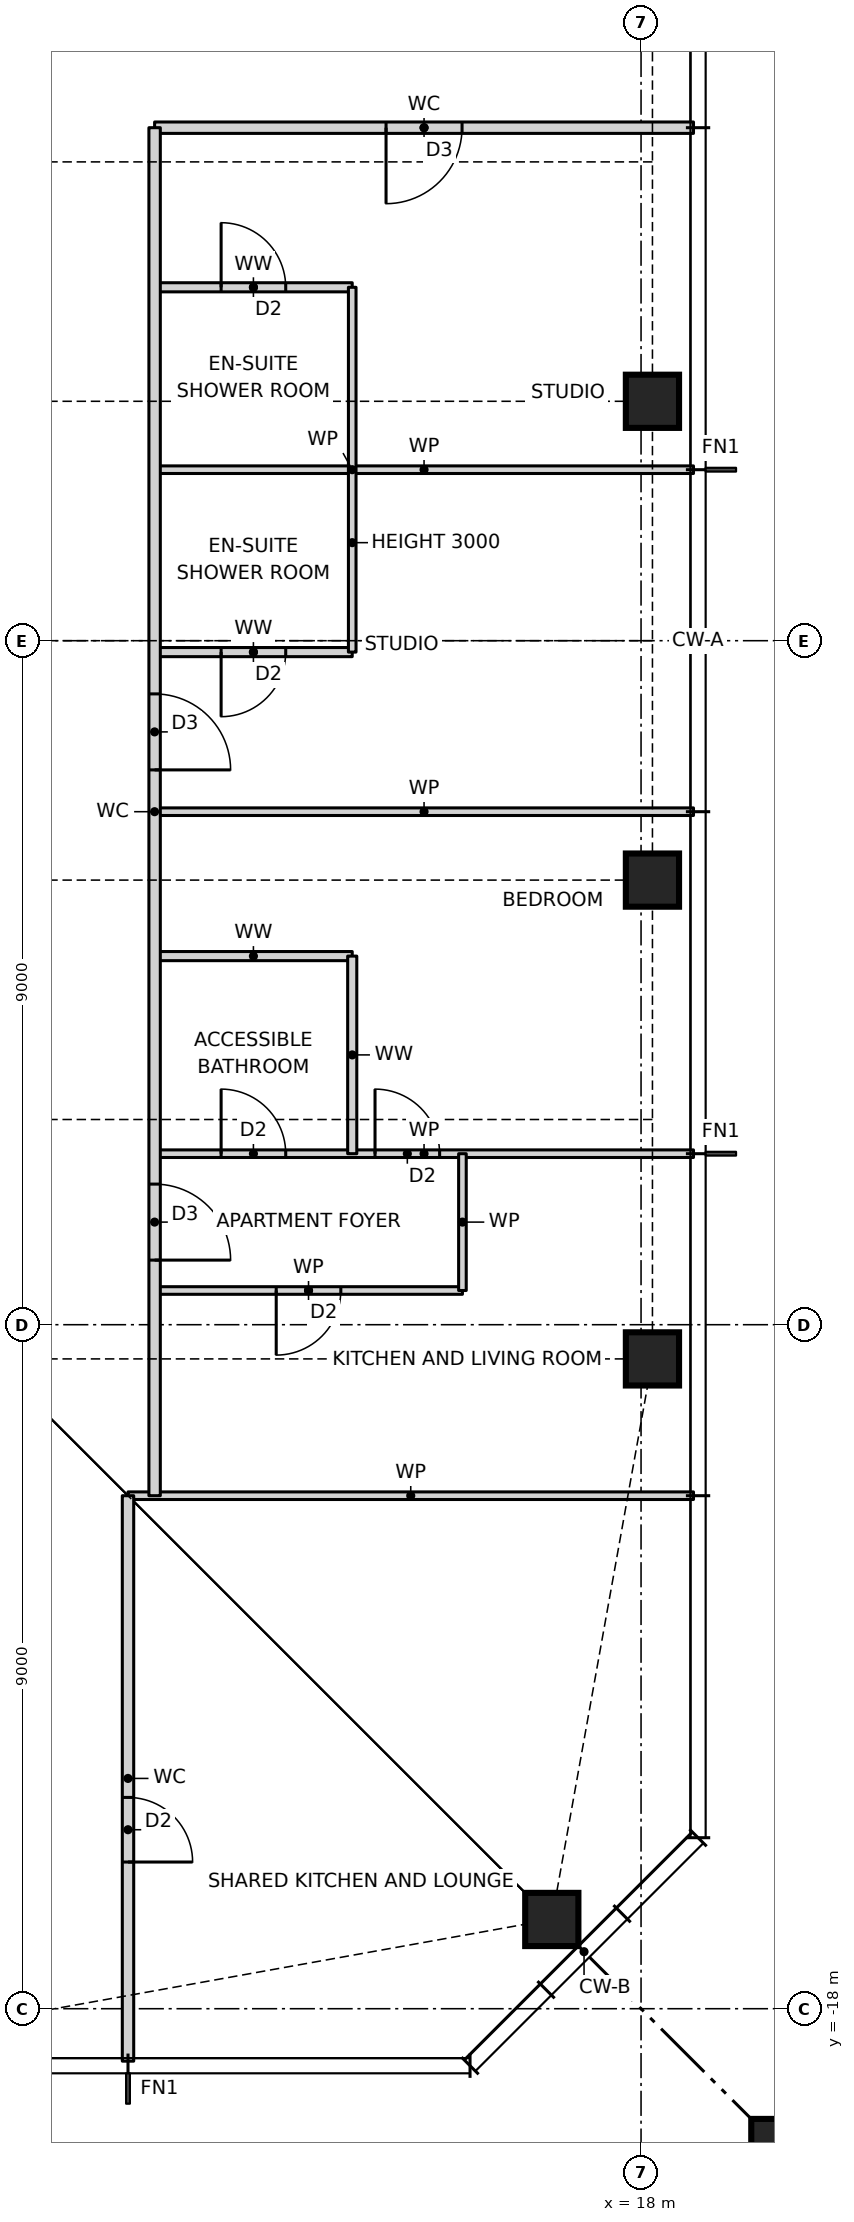
"""IFC4 building model, lengths in metres.
Left out: names, types, materials, properties, quantities, classifications, styles, units other than length and angle.
Written with IfcOpenShell. Run it as: python <this file> out.ifc"""

import sys

from ifc_helpers import new_model, si_unit, direction, frame, frame_2d, origin, origin_2d, place, context, subcontext, project, spatial, rectangle, hollow_rectangle, i_section, extrude, element, fill, save


model = new_model("IFC4")
c1 = context("Model", 3, precision=1e-05, world=origin(), true_north=direction((0.0, 1.0)))
c2 = subcontext(c1, "Body", "Model", "MODEL_VIEW")
j1 = project(units=[si_unit("LENGTHUNIT", "METRE"), si_unit("PLANEANGLEUNIT", "RADIAN")], contexts=[c1])
p1 = place(None, origin())
s1 = spatial("IfcSite", under=j1, at=p1, CompositionType="ELEMENT")
p2 = place(p1, origin())
s2 = spatial("IfcBuilding", under=s1, at=p2, CompositionType="ELEMENT")
p3 = place(p2, frame((0.0, 0.0, 160.0)))
s3 = spatial("IfcBuildingStorey", under=s2, at=p3, CompositionType="ELEMENT", Elevation=160.0)
for number, where, z_axis, x_axis in (
    (1, (16.826, -16.826, 0.0), (0.0, 0.0, 1.0), (1.0, 0.0, 0.0)),
    (2, (18.15, -9.45, 0.0), (0.0, 0.0, 1.0), (1.0, 0.0, 0.0)),
    (3, (18.15, -3.15, 0.0), (0.0, 0.0, 1.0), (1.0, 0.0, 0.0)),
    (4, (18.15, 3.15, 0.0), (0.0, 0.0, 1.0), (1.0, 0.0, 0.0)),
):
    element("IfcColumn", number, at=place(p3, frame(where, z_axis=z_axis, x_axis=x_axis)), inside=s3, PredefinedType="COLUMN", context=c2, shape_type="SweptSolid", body=[
        extrude(hollow_rectangle(XDim=0.7, YDim=0.7, WallThickness=0.06, at=origin_2d()), origin(), (0.0, 0.0, 1.0), 3.5),
    ])
p4 = place(p3, frame((21.65, -21.65, 0.0), z_axis=(0.0, 0.0, 1.0), x_axis=(1.0, 0.0, 0.0)))
e5 = element("IfcColumn", 5, at=p4, inside=s3, PredefinedType="COLUMN", context=c2, shape_type="SweptSolid", body=[
    extrude(rectangle(XDim=4.4, YDim=4.4, at=origin_2d()), origin(), (0.0, 0.0, 1.0), 3.5),
    extrude(i_section(OverallWidth=0.478, OverallDepth=0.599, WebThickness=0.1, FlangeThickness=0.14, at=origin_2d()), origin(), (0.0, 0.0, 1.0), 3.5),
])
p5 = place(p3, frame((11.25, -11.25, 0.0), z_axis=(0.0, 0.0, 1.0), x_axis=(1.0, 0.0, 0.0)))
e6 = element("IfcWall", 6, at=p5, inside=s3, PredefinedType="PARTITIONING", context=c2, shape_type="SweptSolid", body=[
    extrude(rectangle(XDim=7.44, YDim=0.1, at=frame_2d((3.72, 0.0))), origin(), (0.0, 0.0, 1.0), 3.27),
])
p6 = place(p3, frame((11.6, -8.55, 0.0), z_axis=(0.0, 0.0, 1.0), x_axis=(1.0, 0.0, 0.0)))
e7 = element("IfcWall", 7, at=p6, inside=s3, PredefinedType="PARTITIONING", context=c2, shape_type="SweptSolid", body=[
    extrude(rectangle(XDim=4.05, YDim=0.1, at=frame_2d((2.025, 0.0))), origin(), (0.0, 0.0, 1.0), 3.27),
])
p7 = place(p6, frame((1.6, 0.0, 0.0)))
e8 = element("IfcOpeningElement", 8, at=p7, cuts=e7, PredefinedType="OPENING", context=c2, shape_type="SweptSolid", body=[
    extrude(rectangle(XDim=0.85, YDim=2.1, at=frame_2d((0.425, 1.05))), frame((0.0, 0.06, 0.0), z_axis=(0.0, -1.0, 0.0), x_axis=(1.0, 0.0, 0.0)), (0.0, 0.0, 1.0), 0.12),
])
p8 = place(p3, frame((11.6, -6.75, 0.0), z_axis=(0.0, 0.0, 1.0), x_axis=(1.0, 0.0, 0.0)))
e9 = element("IfcWall", 9, at=p8, inside=s3, PredefinedType="PARTITIONING", context=c2, shape_type="SweptSolid", body=[
    extrude(rectangle(XDim=7.09, YDim=0.1, at=frame_2d((3.545, 0.0))), origin(), (0.0, 0.0, 1.0), 3.27),
])
p9 = place(p8, frame((2.9, 0.0, 0.0)))
e10 = element("IfcOpeningElement", 10, at=p9, cuts=e9, PredefinedType="OPENING", context=c2, shape_type="SweptSolid", body=[
    extrude(rectangle(XDim=0.85, YDim=2.1, at=frame_2d((0.425, 1.05))), frame((0.0, 0.06, 0.0), z_axis=(0.0, -1.0, 0.0), x_axis=(1.0, 0.0, 0.0)), (0.0, 0.0, 1.0), 0.12),
])
p10 = place(p8, frame((0.875, 0.0, 0.0)))
e11 = element("IfcOpeningElement", 11, at=p10, cuts=e9, PredefinedType="OPENING", context=c2, shape_type="SweptSolid", body=[
    extrude(rectangle(XDim=0.85, YDim=2.1, at=frame_2d((0.425, 1.05))), frame((0.0, 0.06, 0.0), z_axis=(0.0, -1.0, 0.0), x_axis=(1.0, 0.0, 0.0)), (0.0, 0.0, 1.0), 0.12),
])
p11 = place(p3, frame((11.6, -4.15, 0.0), z_axis=(0.0, 0.0, 1.0), x_axis=(1.0, 0.0, 0.0)))
e12 = element("IfcWall", 12, at=p11, inside=s3, PredefinedType="PARTITIONING", context=c2, shape_type="SweptSolid", body=[
    extrude(rectangle(XDim=2.6, YDim=0.12, at=frame_2d((1.3, 0.0))), origin(), (0.0, 0.0, 1.0), 3.27),
])
p12 = place(p3, frame((11.6, -2.25, 0.0), z_axis=(0.0, 0.0, 1.0), x_axis=(1.0, 0.0, 0.0)))
e13 = element("IfcWall", 13, at=p12, inside=s3, PredefinedType="PARTITIONING", context=c2, shape_type="SweptSolid", body=[
    extrude(rectangle(XDim=7.09, YDim=0.1, at=frame_2d((3.545, 0.0))), origin(), (0.0, 0.0, 1.0), 3.27),
])
p13 = place(p3, frame((11.6, -0.15, 0.0), z_axis=(0.0, 0.0, 1.0), x_axis=(1.0, 0.0, 0.0)))
e14 = element("IfcWall", 14, at=p13, inside=s3, PredefinedType="PARTITIONING", context=c2, shape_type="SweptSolid", body=[
    extrude(rectangle(XDim=2.6, YDim=0.12, at=frame_2d((1.3, 0.0))), origin(), (0.0, 0.0, 1.0), 3.27),
])
p14 = place(p13, frame((0.875, 0.0, 0.0)))
e15 = element("IfcOpeningElement", 15, at=p14, cuts=e14, PredefinedType="OPENING", context=c2, shape_type="SweptSolid", body=[
    extrude(rectangle(XDim=0.85, YDim=2.1, at=frame_2d((0.425, 1.05))), frame((0.0, 0.07, 0.0), z_axis=(0.0, -1.0, 0.0), x_axis=(1.0, 0.0, 0.0)), (0.0, 0.0, 1.0), 0.14),
])
p15 = place(p3, frame((11.6, 2.25, 0.0), z_axis=(0.0, 0.0, 1.0), x_axis=(1.0, 0.0, 0.0)))
e16 = element("IfcWall", 16, at=p15, inside=s3, PredefinedType="PARTITIONING", context=c2, shape_type="SweptSolid", body=[
    extrude(rectangle(XDim=7.09, YDim=0.1, at=frame_2d((3.545, 0.0))), origin(), (0.0, 0.0, 1.0), 3.27),
])
p16 = place(p3, frame((11.6, 4.65, 0.0), z_axis=(0.0, 0.0, 1.0), x_axis=(1.0, 0.0, 0.0)))
e17 = element("IfcWall", 17, at=p16, inside=s3, PredefinedType="PARTITIONING", context=c2, shape_type="SweptSolid", body=[
    extrude(rectangle(XDim=2.6, YDim=0.12, at=frame_2d((1.3, 0.0))), origin(), (0.0, 0.0, 1.0), 3.27),
])
p17 = place(p16, frame((0.875, 0.0, 0.0)))
e18 = element("IfcOpeningElement", 18, at=p17, cuts=e17, PredefinedType="OPENING", context=c2, shape_type="SweptSolid", body=[
    extrude(rectangle(XDim=0.85, YDim=2.1, at=frame_2d((0.425, 1.05))), frame((0.0, 0.07, 0.0), z_axis=(0.0, -1.0, 0.0), x_axis=(1.0, 0.0, 0.0)), (0.0, 0.0, 1.0), 0.14),
])
p18 = place(p3, frame((11.6, 6.75, 0.0), z_axis=(0.0, 0.0, 1.0), x_axis=(1.0, 0.0, 0.0)))
e19 = element("IfcWall", 19, at=p18, inside=s3, PredefinedType="PARTITIONING", context=c2, shape_type="SweptSolid", body=[
    extrude(rectangle(XDim=7.09, YDim=0.15, at=frame_2d((3.545, 0.0))), origin(), (0.0, 0.0, 1.0), 3.27),
])
p19 = place(p18, frame((3.045, 0.0, 0.0)))
e20 = element("IfcOpeningElement", 20, at=p19, cuts=e19, PredefinedType="OPENING", context=c2, shape_type="SweptSolid", body=[
    extrude(rectangle(XDim=1.0, YDim=2.1, at=frame_2d((0.5, 1.05))), frame((0.0, 0.085, 0.0), z_axis=(0.0, -1.0, 0.0), x_axis=(1.0, 0.0, 0.0)), (0.0, 0.0, 1.0), 0.17),
])
p20 = place(p3, frame((15.65, -8.55, 0.0), z_axis=(0.0, 0.0, 1.0), x_axis=(0.0, 1.0, 0.0)))
e21 = element("IfcWall", 21, at=p20, inside=s3, PredefinedType="PARTITIONING", context=c2, shape_type="SweptSolid", body=[
    extrude(rectangle(XDim=1.8, YDim=0.1, at=frame_2d((0.9, 0.0))), origin(), (0.0, 0.0, 1.0), 3.27),
])
p21 = place(p3, frame((14.2, -6.75, 0.0), z_axis=(0.0, 0.0, 1.0), x_axis=(0.0, 1.0, 0.0)))
e22 = element("IfcWall", 22, at=p21, inside=s3, PredefinedType="PARTITIONING", context=c2, shape_type="SweptSolid", body=[
    extrude(rectangle(XDim=2.6, YDim=0.12, at=frame_2d((1.3, 0.0))), origin(), (0.0, 0.0, 1.0), 3.27),
])
p22 = place(p3, frame((14.2, -0.15, 0.0), z_axis=(0.0, 0.0, 1.0), x_axis=(0.0, 1.0, 0.0)))
e23 = element("IfcWall", 23, at=p22, inside=s3, PredefinedType="PARTITIONING", context=c2, shape_type="SweptSolid", body=[
    extrude(rectangle(XDim=4.8, YDim=0.1, at=frame_2d((2.4, 0.0))), origin(), (0.0, 0.0, 1.0), 3.0),
])
p23 = place(p3, frame((11.6, -11.25, 0.0), z_axis=(0.0, 0.0, 1.0), x_axis=(0.0, 1.0, 0.0)))
e24 = element("IfcWall", 24, at=p23, inside=s3, PredefinedType="PARTITIONING", context=c2, shape_type="SweptSolid", body=[
    extrude(rectangle(XDim=18.0, YDim=0.15, at=frame_2d((9.0, 0.0))), origin(), (0.0, 0.0, 1.0), 3.27),
])
p24 = place(p23, frame((3.1, 0.0, 0.0)))
e25 = element("IfcOpeningElement", 25, at=p24, cuts=e24, PredefinedType="OPENING", context=c2, shape_type="SweptSolid", body=[
    extrude(rectangle(XDim=1.0, YDim=2.1, at=frame_2d((0.5, 1.05))), frame((0.0, 0.085, 0.0), z_axis=(0.0, -1.0, 0.0), x_axis=(1.0, 0.0, 0.0)), (0.0, 0.0, 1.0), 0.17),
])
p25 = place(p23, frame((9.55, 0.0, 0.0)))
e26 = element("IfcOpeningElement", 26, at=p25, cuts=e24, PredefinedType="OPENING", context=c2, shape_type="SweptSolid", body=[
    extrude(rectangle(XDim=1.0, YDim=2.1, at=frame_2d((0.5, 1.05))), frame((0.0, 0.085, 0.0), z_axis=(0.0, -1.0, 0.0), x_axis=(1.0, 0.0, 0.0)), (0.0, 0.0, 1.0), 0.17),
])
p26 = place(p3, frame((11.25, -18.69, 0.0), z_axis=(0.0, 0.0, 1.0), x_axis=(0.0, 1.0, 0.0)))
e27 = element("IfcWall", 27, at=p26, inside=s3, PredefinedType="PARTITIONING", context=c2, shape_type="SweptSolid", body=[
    extrude(rectangle(XDim=7.44, YDim=0.15, at=frame_2d((3.72, 0.0))), origin(), (0.0, 0.0, 1.0), 3.27),
])
p27 = place(p26, frame((2.62, 0.0, 0.0)))
e28 = element("IfcOpeningElement", 28, at=p27, cuts=e27, PredefinedType="OPENING", context=c2, shape_type="SweptSolid", body=[
    extrude(rectangle(XDim=0.85, YDim=2.1, at=frame_2d((0.425, 1.05))), frame((0.0, 0.085, 0.0), z_axis=(0.0, -1.0, 0.0), x_axis=(1.0, 0.0, 0.0)), (0.0, 0.0, 1.0), 0.17),
])
p28 = place(p24, frame((1.0, 0.0, 0.0), z_axis=(0.0, 0.0, 1.0), x_axis=(-1.0, 0.0, 0.0)))
e29 = element("IfcDoor", 29, at=p28, inside=s3, OperationType="SINGLE_SWING_RIGHT", PredefinedType="DOOR", context=c2, shape_type="SweptSolid", body=[
    extrude(rectangle(XDim=1.0, YDim=2.1, at=frame_2d((0.5, 1.05))), frame((0.0, 0.025, 0.0), z_axis=(0.0, -1.0, 0.0), x_axis=(1.0, 0.0, 0.0)), (0.0, 0.0, 1.0), 0.05),
])
fill(e25, e29)
p29 = place(p7, frame((0.85, 0.0, 0.0), z_axis=(0.0, 0.0, 1.0), x_axis=(-1.0, 0.0, 0.0)))
e30 = element("IfcDoor", 30, at=p29, inside=s3, OperationType="SINGLE_SWING_RIGHT", PredefinedType="DOOR", context=c2, shape_type="SweptSolid", body=[
    extrude(rectangle(XDim=0.85, YDim=2.1, at=frame_2d((0.425, 1.05))), frame((0.0, 0.025, 0.0), z_axis=(0.0, -1.0, 0.0), x_axis=(1.0, 0.0, 0.0)), (0.0, 0.0, 1.0), 0.05),
])
fill(e8, e30)
p30 = place(p9, origin())
e31 = element("IfcDoor", 31, at=p30, inside=s3, OperationType="SINGLE_SWING_LEFT", PredefinedType="DOOR", context=c2, shape_type="SweptSolid", body=[
    extrude(rectangle(XDim=0.85, YDim=2.1, at=frame_2d((0.425, 1.05))), frame((0.0, 0.025, 0.0), z_axis=(0.0, -1.0, 0.0), x_axis=(1.0, 0.0, 0.0)), (0.0, 0.0, 1.0), 0.05),
])
fill(e10, e31)
p31 = place(p10, origin())
e32 = element("IfcDoor", 32, at=p31, inside=s3, OperationType="SINGLE_SWING_LEFT", PredefinedType="DOOR", context=c2, shape_type="SweptSolid", body=[
    extrude(rectangle(XDim=0.85, YDim=2.1, at=frame_2d((0.425, 1.05))), frame((0.0, 0.025, 0.0), z_axis=(0.0, -1.0, 0.0), x_axis=(1.0, 0.0, 0.0)), (0.0, 0.0, 1.0), 0.05),
])
fill(e11, e32)
p32 = place(p25, frame((1.0, 0.0, 0.0), z_axis=(0.0, 0.0, 1.0), x_axis=(-1.0, 0.0, 0.0)))
e33 = element("IfcDoor", 33, at=p32, inside=s3, OperationType="SINGLE_SWING_RIGHT", PredefinedType="DOOR", context=c2, shape_type="SweptSolid", body=[
    extrude(rectangle(XDim=1.0, YDim=2.1, at=frame_2d((0.5, 1.05))), frame((0.0, 0.025, 0.0), z_axis=(0.0, -1.0, 0.0), x_axis=(1.0, 0.0, 0.0)), (0.0, 0.0, 1.0), 0.05),
])
fill(e26, e33)
p33 = place(p14, frame((0.85, 0.0, 0.0), z_axis=(0.0, 0.0, 1.0), x_axis=(-1.0, 0.0, 0.0)))
e34 = element("IfcDoor", 34, at=p33, inside=s3, OperationType="SINGLE_SWING_RIGHT", PredefinedType="DOOR", context=c2, shape_type="SweptSolid", body=[
    extrude(rectangle(XDim=0.85, YDim=2.1, at=frame_2d((0.425, 1.05))), frame((0.0, 0.025, 0.0), z_axis=(0.0, -1.0, 0.0), x_axis=(1.0, 0.0, 0.0)), (0.0, 0.0, 1.0), 0.05),
])
fill(e15, e34)
p34 = place(p19, frame((1.0, 0.0, 0.0), z_axis=(0.0, 0.0, 1.0), x_axis=(-1.0, 0.0, 0.0)))
e35 = element("IfcDoor", 35, at=p34, inside=s3, OperationType="SINGLE_SWING_RIGHT", PredefinedType="DOOR", context=c2, shape_type="SweptSolid", body=[
    extrude(rectangle(XDim=1.0, YDim=2.1, at=frame_2d((0.5, 1.05))), frame((0.0, 0.025, 0.0), z_axis=(0.0, -1.0, 0.0), x_axis=(1.0, 0.0, 0.0)), (0.0, 0.0, 1.0), 0.05),
])
fill(e20, e35)
p35 = place(p17, origin())
e36 = element("IfcDoor", 36, at=p35, inside=s3, OperationType="SINGLE_SWING_LEFT", PredefinedType="DOOR", context=c2, shape_type="SweptSolid", body=[
    extrude(rectangle(XDim=0.85, YDim=2.1, at=frame_2d((0.425, 1.05))), frame((0.0, 0.025, 0.0), z_axis=(0.0, -1.0, 0.0), x_axis=(1.0, 0.0, 0.0)), (0.0, 0.0, 1.0), 0.05),
])
fill(e18, e36)
p36 = place(p27, frame((0.85, 0.0, 0.0), z_axis=(0.0, 0.0, 1.0), x_axis=(-1.0, 0.0, 0.0)))
e37 = element("IfcDoor", 37, at=p36, inside=s3, OperationType="SINGLE_SWING_RIGHT", PredefinedType="DOOR", context=c2, shape_type="SweptSolid", body=[
    extrude(rectangle(XDim=0.85, YDim=2.1, at=frame_2d((0.425, 1.05))), frame((0.0, 0.025, 0.0), z_axis=(0.0, -1.0, 0.0), x_axis=(1.0, 0.0, 0.0)), (0.0, 0.0, 1.0), 0.05),
])
fill(e28, e37)
save(model, sys.argv[1])
